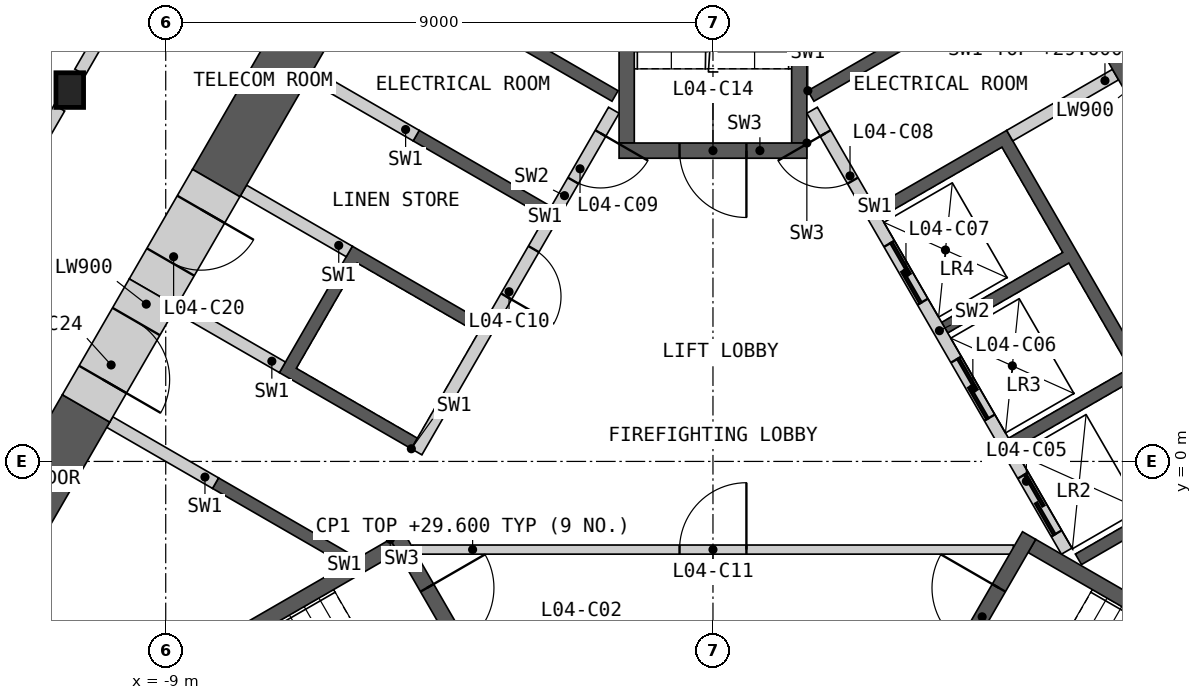
"""IFC4 building model, lengths in metres.
Left out: names, types, materials, properties, quantities, classifications, styles, units other than length and angle.
Written with IfcOpenShell. Run it as: python <this file> out.ifc"""

import sys

from ifc_helpers import new_model, si_unit, direction, frame, frame_2d, origin, origin_2d, place, context, subcontext, project, spatial, polyline, rectangle, i_section, outline, extrude, element, fill, save


model = new_model("IFC4")
c1 = context("Model", 3, precision=1e-05, world=origin(), true_north=direction((0.0, 1.0)))
c2 = subcontext(c1, "Body", "Model", "MODEL_VIEW")
j1 = project(units=[si_unit("LENGTHUNIT", "METRE"), si_unit("PLANEANGLEUNIT", "RADIAN")], contexts=[c1])
p1 = place(None, origin())
s1 = spatial("IfcSite", under=j1, at=p1, CompositionType="ELEMENT")
p2 = place(p1, origin())
s2 = spatial("IfcBuilding", under=s1, at=p2, CompositionType="ELEMENT")
p3 = place(p2, frame((0.0, 0.0, 25.5)))
s3 = spatial("IfcBuildingStorey", under=s2, at=p3, CompositionType="ELEMENT", Elevation=25.5)
p4 = place(p3, frame((-10.578, 6.107, 0.0), z_axis=(0.0, 0.0, 1.0), x_axis=(1.0, 0.0, 0.0)))
e1 = element("IfcColumn", 1, at=p4, inside=s3, PredefinedType="COLUMN", context=c2, shape_type="SweptSolid", body=[
    extrude(i_section(OverallWidth=0.454, OverallDepth=0.57, WebThickness=0.078, FlangeThickness=0.125, at=origin_2d()), origin(), (0.0, 0.0, 1.0), 4.5),
])
p5 = place(p3, origin())
e2 = element("IfcWall", 2, at=p5, inside=s3, PredefinedType="SHEAR", context=c2, shape_type="SweptSolid", body=[
    extrude(outline(polyline([(1.561, 6.097), (3.731, 7.35), (3.831, 7.177), (1.66, 5.924), (1.561, 6.097)])), origin(), (0.0, 0.0, 1.0), 4.1),
])
p6 = place(p3, origin())
e3 = element("IfcWall", 3, at=p6, inside=s3, PredefinedType="SHEAR", context=c2, shape_type="SweptSolid", body=[
    extrude(outline(polyline([(2.66, 4.192), (4.831, 5.445), (8.231, -0.444), (6.061, -1.697), (5.96, -1.524), (7.952, -0.374), (6.952, 1.358), (4.96, 0.208), (4.861, 0.381), (6.852, 1.531), (5.852, 3.263), (3.861, 2.113), (3.76, 2.287), (5.752, 3.437), (4.752, 5.169), (2.76, 4.019), (2.66, 4.192)])), origin(), (0.0, 0.0, 1.0), 4.1),
])
p7 = place(p3, frame((5.817, -1.476, 0.0), z_axis=(0.0, 0.0, 1.0), x_axis=(-0.500002616675, 0.866023893041, 0.0)))
e4 = element("IfcWall", 4, at=p7, inside=s3, PredefinedType="SOLIDWALL", context=c2, shape_type="SweptSolid", body=[
    extrude(rectangle(XDim=8.373, YDim=0.2, at=frame_2d((4.187, 0.0))), origin(), (0.0, 0.0, 1.0), 4.1),
])
p8 = place(p7, frame((0.337, 0.0, 0.0)))
e5 = element("IfcOpeningElement", 5, at=p8, cuts=e4, PredefinedType="OPENING", context=c2, shape_type="SweptSolid", body=[
    extrude(rectangle(XDim=1.1, YDim=2.1, at=frame_2d((0.55, 1.05))), frame((0.0, 0.11, 0.0), z_axis=(0.0, -1.0, 0.0), x_axis=(1.0, 0.0, 0.0)), (0.0, 0.0, 1.0), 0.22),
])
p9 = place(p7, frame((2.537, 0.0, 0.0)))
e6 = element("IfcOpeningElement", 6, at=p9, cuts=e4, PredefinedType="OPENING", context=c2, shape_type="SweptSolid", body=[
    extrude(rectangle(XDim=1.1, YDim=2.1, at=frame_2d((0.55, 1.05))), frame((0.0, 0.11, 0.0), z_axis=(0.0, -1.0, 0.0), x_axis=(1.0, 0.0, 0.0)), (0.0, 0.0, 1.0), 0.22),
])
p10 = place(p7, frame((4.737, 0.0, 0.0)))
e7 = element("IfcOpeningElement", 7, at=p10, cuts=e4, PredefinedType="OPENING", context=c2, shape_type="SweptSolid", body=[
    extrude(rectangle(XDim=1.1, YDim=2.1, at=frame_2d((0.55, 1.05))), frame((0.0, 0.11, 0.0), z_axis=(0.0, -1.0, 0.0), x_axis=(1.0, 0.0, 0.0)), (0.0, 0.0, 1.0), 0.22),
])
p11 = place(p7, frame((7.037, 0.0, 0.0)))
e8 = element("IfcOpeningElement", 8, at=p11, cuts=e4, PredefinedType="OPENING", context=c2, shape_type="SweptSolid", body=[
    extrude(rectangle(XDim=0.9, YDim=2.1, at=frame_2d((0.45, 1.05))), frame((0.0, 0.11, 0.0), z_axis=(0.0, -1.0, 0.0), x_axis=(1.0, 0.0, 0.0)), (0.0, 0.0, 1.0), 0.22),
])
p12 = place(p3, frame((4.881, 5.358, 0.0), z_axis=(0.0, 0.0, 1.0), x_axis=(0.866035824272, 0.499981950752, 0.0)))
e9 = element("IfcWall", 9, at=p12, inside=s3, PredefinedType="SHEAR", context=c2, shape_type="SweptSolid", body=[
    extrude(rectangle(XDim=2.009, YDim=0.2, at=frame_2d((1.004, 0.0))), origin(), (0.0, 0.0, 1.0), 4.1),
])
p13 = place(p3, origin())
e10 = element("IfcWall", 10, at=p13, inside=s3, PredefinedType="SHEAR", context=c2, shape_type="SweptSolid", body=[
    extrude(outline(polyline([(-6.061, -1.697), (-8.231, -0.444), (-8.131, -0.271), (-5.96, -1.524), (-6.061, -1.697)])), origin(), (0.0, 0.0, 1.0), 4.1),
])
p14 = place(p3, origin())
e11 = element("IfcWall", 11, at=p14, inside=s3, PredefinedType="SHEAR", context=c2, shape_type="SweptSolid", body=[
    extrude(outline(polyline([(-4.96, 0.208), (-7.131, 1.461), (-5.931, 3.54), (-3.76, 2.287), (-3.861, 2.113), (-5.852, 3.263), (-6.852, 1.531), (-4.861, 0.381), (-4.96, 0.208)])), origin(), (0.0, 0.0, 1.0), 4.1),
])
p15 = place(p3, origin())
e12 = element("IfcWall", 12, at=p15, inside=s3, PredefinedType="SHEAR", context=c2, shape_type="SweptSolid", body=[
    extrude(outline(polyline([(-2.76, 4.019), (-4.931, 5.272), (-4.831, 5.445), (-2.66, 4.192), (-2.76, 4.019)])), origin(), (0.0, 0.0, 1.0), 4.1),
])
p16 = place(p3, origin())
e13 = element("IfcWall", 13, at=p16, inside=s3, PredefinedType="SHEAR", context=c2, shape_type="SweptSolid", body=[
    extrude(outline(polyline([(-3.731, 7.35), (-1.561, 6.097), (-1.66, 5.924), (-3.831, 7.177), (-3.731, 7.35)])), origin(), (0.0, 0.0, 1.0), 4.1),
])
p17 = place(p3, frame((-1.631, 5.776, 0.0), z_axis=(0.0, 0.0, 1.0), x_axis=(-0.499992876559, -0.866029516466, 0.0)))
e14 = element("IfcWall", 14, at=p17, inside=s3, PredefinedType="SOLIDWALL", context=c2, shape_type="SweptSolid", body=[
    extrude(rectangle(XDim=6.486, YDim=0.2, at=frame_2d((3.243, 0.0))), origin(), (0.0, 0.0, 1.0), 4.1),
])
p18 = place(p17, frame((0.437, 0.0, 0.0)))
e15 = element("IfcOpeningElement", 15, at=p18, cuts=e14, PredefinedType="OPENING", context=c2, shape_type="SweptSolid", body=[
    extrude(rectangle(XDim=0.9, YDim=2.1, at=frame_2d((0.45, 1.05))), frame((0.0, 0.11, 0.0), z_axis=(0.0, -1.0, 0.0), x_axis=(1.0, 0.0, 0.0)), (0.0, 0.0, 1.0), 0.22),
])
p19 = place(p17, frame((2.637, 0.0, 0.0)))
e16 = element("IfcOpeningElement", 16, at=p19, cuts=e14, PredefinedType="OPENING", context=c2, shape_type="SweptSolid", body=[
    extrude(rectangle(XDim=0.9, YDim=2.1, at=frame_2d((0.45, 1.05))), frame((0.0, 0.11, 0.0), z_axis=(0.0, -1.0, 0.0), x_axis=(1.0, 0.0, 0.0)), (0.0, 0.0, 1.0), 0.22),
])
p20 = place(p3, frame((-4.881, 5.358, 0.0), z_axis=(0.0, 0.0, 1.0), x_axis=(-0.866035824272, 0.499981950752, 0.0)))
e17 = element("IfcWall", 17, at=p20, inside=s3, PredefinedType="SHEAR", context=c2, shape_type="SweptSolid", body=[
    extrude(rectangle(XDim=2.009, YDim=0.2, at=frame_2d((1.004, 0.0))), origin(), (0.0, 0.0, 1.0), 4.1),
])
p21 = place(p3, frame((-5.981, 3.453, 0.0), z_axis=(0.0, 0.0, 1.0), x_axis=(-0.866013584312, 0.500020471368, 0.0)))
e18 = element("IfcWall", 18, at=p21, inside=s3, PredefinedType="SHEAR", context=c2, shape_type="SweptSolid", body=[
    extrude(rectangle(XDim=2.009, YDim=0.2, at=frame_2d((1.005, 0.0))), origin(), (0.0, 0.0, 1.0), 4.1),
])
p22 = place(p3, frame((-7.081, 1.548, 0.0), z_axis=(0.0, 0.0, 1.0), x_axis=(-0.865983199114, 0.50007309351, 0.0)))
e19 = element("IfcWall", 19, at=p22, inside=s3, PredefinedType="SHEAR", context=c2, shape_type="SweptSolid", body=[
    extrude(rectangle(XDim=2.009, YDim=0.2, at=frame_2d((1.004, 0.0))), origin(), (0.0, 0.0, 1.0), 4.1),
])
p23 = place(p3, frame((-8.181, -0.357, 0.0), z_axis=(0.0, 0.0, 1.0), x_axis=(-0.866035824272, 0.499981950752, 0.0)))
e20 = element("IfcWall", 20, at=p23, inside=s3, PredefinedType="SHEAR", context=c2, shape_type="SweptSolid", body=[
    extrude(rectangle(XDim=2.009, YDim=0.2, at=frame_2d((1.004, 0.0))), origin(), (0.0, 0.0, 1.0), 4.1),
])
p24 = place(p3, frame((-4.941, -1.45, 0.0), z_axis=(0.0, 0.0, 1.0), x_axis=(1.0, 0.0, 0.0)))
e21 = element("IfcWall", 21, at=p24, inside=s3, PredefinedType="PARTITIONING", context=c2, shape_type="SweptSolid", body=[
    extrude(rectangle(XDim=9.882, YDim=0.15, at=frame_2d((4.941, 0.0))), origin(), (0.0, 0.0, 1.0), 4.1),
])
p25 = place(p24, frame((4.391, 0.0, 0.0)))
e22 = element("IfcOpeningElement", 22, at=p25, cuts=e21, PredefinedType="OPENING", context=c2, shape_type="SweptSolid", body=[
    extrude(rectangle(XDim=1.1, YDim=2.1, at=frame_2d((0.55, 1.05))), frame((0.0, 0.085, 0.0), z_axis=(0.0, -1.0, 0.0), x_axis=(1.0, 0.0, 0.0)), (0.0, 0.0, 1.0), 0.17),
])
p26 = place(p3, origin())
e23 = element("IfcWall", 23, at=p26, inside=s3, PredefinedType="SHEAR", context=c2, shape_type="SweptSolid", body=[
    extrude(outline(polyline([(-5.307, -1.281), (-10.374, -4.206), (-10.032, -4.298), (-5.182, -1.498), (-5.307, -1.281)])), origin(), (0.0, 0.0, 1.0), 4.1),
])
p27 = place(p3, frame((-5.199, -1.219, 0.0), z_axis=(0.0, 0.0, 1.0), x_axis=(0.499982516597, -0.866035497597, 0.0)))
e24 = element("IfcWall", 24, at=p27, inside=s3, PredefinedType="SHEAR", context=c2, shape_type="SweptSolid", body=[
    extrude(rectangle(XDim=3.088, YDim=0.25, at=frame_2d((1.544, 0.0))), origin(), (0.0, 0.0, 1.0), 4.1),
])
p28 = place(p27, frame((0.994, 0.0, 0.0)))
e25 = element("IfcOpeningElement", 25, at=p28, cuts=e24, PredefinedType="OPENING", context=c2, shape_type="SweptSolid", body=[
    extrude(rectangle(XDim=1.1, YDim=2.1, at=frame_2d((0.55, 1.05))), frame((0.0, 0.135, 0.0), z_axis=(0.0, -1.0, 0.0), x_axis=(1.0, 0.0, 0.0)), (0.0, 0.0, 1.0), 0.27),
])
p29 = place(p3, origin())
e26 = element("IfcWall", 26, at=p29, inside=s3, PredefinedType="SHEAR", context=c2, shape_type="SweptSolid", body=[
    extrude(outline(polyline([(10.032, -4.298), (10.374, -4.206), (5.307, -1.281), (5.182, -1.498), (10.032, -4.298)])), origin(), (0.0, 0.0, 1.0), 4.1),
])
p30 = place(p3, frame((3.655, -3.893, 0.0), z_axis=(0.0, 0.0, 1.0), x_axis=(0.499982516597, 0.866035497597, 0.0)))
e27 = element("IfcWall", 27, at=p30, inside=s3, PredefinedType="SHEAR", context=c2, shape_type="SweptSolid", body=[
    extrude(rectangle(XDim=3.088, YDim=0.25, at=frame_2d((1.544, 0.0))), origin(), (0.0, 0.0, 1.0), 4.1),
])
p31 = place(p30, frame((0.994, 0.0, 0.0)))
e28 = element("IfcOpeningElement", 28, at=p31, cuts=e27, PredefinedType="OPENING", context=c2, shape_type="SweptSolid", body=[
    extrude(rectangle(XDim=1.1, YDim=2.1, at=frame_2d((0.55, 1.05))), frame((0.0, 0.135, 0.0), z_axis=(0.0, -1.0, 0.0), x_axis=(1.0, 0.0, 0.0)), (0.0, 0.0, 1.0), 0.27),
])
p32 = place(p3, origin())
e29 = element("IfcWall", 29, at=p32, inside=s3, PredefinedType="SHEAR", context=c2, shape_type="SweptSolid", body=[
    extrude(outline(polyline([(1.544, 5.237), (1.544, 11.087), (1.294, 10.837), (1.294, 5.237), (1.544, 5.237)])), origin(), (0.0, 0.0, 1.0), 4.1),
])
p33 = place(p3, origin())
e30 = element("IfcWall", 30, at=p33, inside=s3, PredefinedType="SHEAR", context=c2, shape_type="SweptSolid", body=[
    extrude(outline(polyline([(-1.294, 10.837), (-1.544, 11.087), (-1.544, 5.237), (-1.294, 5.237), (-1.294, 10.837)])), origin(), (0.0, 0.0, 1.0), 4.1),
])
p34 = place(p3, frame((1.544, 5.112, 0.0), z_axis=(0.0, 0.0, 1.0), x_axis=(-1.0, 0.0, 0.0)))
e31 = element("IfcWall", 31, at=p34, inside=s3, PredefinedType="SHEAR", context=c2, shape_type="SweptSolid", body=[
    extrude(rectangle(XDim=3.088, YDim=0.25, at=frame_2d((1.544, 0.0))), origin(), (0.0, 0.0, 1.0), 4.1),
])
p35 = place(p34, frame((0.994, 0.0, 0.0)))
e32 = element("IfcOpeningElement", 32, at=p35, cuts=e31, PredefinedType="OPENING", context=c2, shape_type="SweptSolid", body=[
    extrude(rectangle(XDim=1.1, YDim=2.1, at=frame_2d((0.55, 1.05))), frame((0.0, 0.135, 0.0), z_axis=(0.0, -1.0, 0.0), x_axis=(1.0, 0.0, 0.0)), (0.0, 0.0, 1.0), 0.27),
])
p36 = place(p3, frame((8.684, 3.688, 0.0), z_axis=(0.0, 0.0, 1.0), x_axis=(-0.499990189338, 0.866031067899, 0.0)))
e33 = element("IfcWall", 33, at=p36, inside=s3, PredefinedType="SHEAR", context=c2, shape_type="SweptSolid", body=[
    extrude(rectangle(XDim=6.157, YDim=0.9, at=frame_2d((3.078, 0.0))), origin(), (0.0, 0.0, 1.0), 4.1),
])
p37 = place(p3, frame((-5.606, 9.021, 0.0), z_axis=(0.0, 0.0, 1.0), x_axis=(-0.500024603663, -0.866011198387, 0.0)))
e34 = element("IfcWall", 34, at=p37, inside=s3, PredefinedType="SHEAR", context=c2, shape_type="SweptSolid", body=[
    extrude(rectangle(XDim=5.129, YDim=0.9, at=frame_2d((2.564, 0.0))), origin(), (0.0, 0.0, 1.0), 4.1),
])
p38 = place(p3, frame((-10.31, 0.872, 0.0), z_axis=(0.0, 0.0, 1.0), x_axis=(-0.499991893987, -0.866030083742, 0.0)))
e35 = element("IfcWall", 35, at=p38, inside=s3, PredefinedType="SHEAR", context=c2, shape_type="SweptSolid", body=[
    extrude(rectangle(XDim=4.471, YDim=0.9, at=frame_2d((2.235, 0.0))), origin(), (0.0, 0.0, 1.0), 4.1),
])
p39 = place(p3, frame((-8.17, 4.579, 0.0), z_axis=(0.0, 0.0, 1.0), x_axis=(-0.499888406853, -0.866089822532, 0.0)))
e36 = element("IfcWall", 36, at=p39, inside=s3, PredefinedType="SHEAR", context=c2, shape_type="SweptSolid", body=[
    extrude(rectangle(XDim=2.08, YDim=0.9, at=frame_2d((1.04, 0.0))), origin(), (0.0, 0.0, 1.0), 4.1),
])
p40 = place(p39, frame((0.5, 0.0, 0.0)))
e37 = element("IfcOpeningElement", 37, at=p40, cuts=e36, PredefinedType="OPENING", context=c2, shape_type="SweptSolid", body=[
    extrude(rectangle(XDim=1.0, YDim=2.1, at=frame_2d((0.5, 1.05))), frame((0.0, 0.46, 0.0), z_axis=(0.0, -1.0, 0.0), x_axis=(1.0, 0.0, 0.0)), (0.0, 0.0, 1.0), 0.92),
])
p41 = place(p3, frame((-9.21, 2.777, 0.0), z_axis=(0.0, 0.0, 1.0), x_axis=(-0.500077893725, -0.86598042715, 0.0)))
e38 = element("IfcWall", 38, at=p41, inside=s3, PredefinedType="SHEAR", context=c2, shape_type="SweptSolid", body=[
    extrude(rectangle(XDim=2.2, YDim=0.9, at=frame_2d((1.1, 0.0))), origin(), (0.0, 0.0, 1.0), 4.1),
])
p42 = place(p41, frame((0.55, 0.0, 0.0)))
e39 = element("IfcOpeningElement", 39, at=p42, cuts=e38, PredefinedType="OPENING", context=c2, shape_type="SweptSolid", body=[
    extrude(rectangle(XDim=1.1, YDim=2.1, at=frame_2d((0.55, 1.05))), frame((0.0, 0.46, 0.0), z_axis=(0.0, -1.0, 0.0), x_axis=(1.0, 0.0, 0.0)), (0.0, 0.0, 1.0), 0.92),
])
p43 = place(p3, frame((-15.698, -2.759, 0.0), z_axis=(0.0, 0.0, 1.0), x_axis=(0.500004292778, 0.866022925334, 0.0)))
e40 = element("IfcWall", 40, at=p43, inside=s3, PredefinedType="PARTITIONING", context=c2, shape_type="SweptSolid", body=[
    extrude(rectangle(XDim=9.898, YDim=0.2, at=frame_2d((4.949, 0.0))), origin(), (0.0, 0.0, 1.0), 4.1),
])
p44 = place(p43, frame((4.1, 0.0, 0.0)))
e41 = element("IfcOpeningElement", 41, at=p44, cuts=e40, PredefinedType="OPENING", context=c2, shape_type="SweptSolid", body=[
    extrude(rectangle(XDim=1.8, YDim=2.1, at=frame_2d((0.9, 1.05))), frame((0.0, 0.11, 0.0), z_axis=(0.0, -1.0, 0.0), x_axis=(1.0, 0.0, 0.0)), (0.0, 0.0, 1.0), 0.22),
])
for number, where, z_axis, x_axis in (
    (42, (5.459, 14.974, 0.0), (0.0, 0.0, 1.0), (0.5, -0.866, 0.0)),
    (43, (-10.408, 6.402, 0.0), (0.0, 0.0, 1.0), (0.5, 0.866, 0.0)),
):
    element("IfcWall", number, at=place(p3, frame(where, z_axis=z_axis, x_axis=x_axis)), inside=s3, PredefinedType="PARTITIONING", context=c2, shape_type="SweptSolid", body=[
        extrude(rectangle(XDim=9.898, YDim=0.2, at=frame_2d((4.949, 0.0))), origin(), (0.0, 0.0, 1.0), 4.1),
    ])
p45 = place(p8, origin())
e44 = element("IfcDoor", 44, at=p45, inside=s3, OperationType="SLIDING_TO_LEFT", PredefinedType="DOOR", context=c2, shape_type="SweptSolid", body=[
    extrude(rectangle(XDim=1.1, YDim=2.1, at=frame_2d((0.55, 1.05))), frame((0.0, 0.025, 0.0), z_axis=(0.0, -1.0, 0.0), x_axis=(1.0, 0.0, 0.0)), (0.0, 0.0, 1.0), 0.05),
])
fill(e5, e44)
p46 = place(p9, origin())
e45 = element("IfcDoor", 45, at=p46, inside=s3, OperationType="SLIDING_TO_LEFT", PredefinedType="DOOR", context=c2, shape_type="SweptSolid", body=[
    extrude(rectangle(XDim=1.1, YDim=2.1, at=frame_2d((0.55, 1.05))), frame((0.0, 0.025, 0.0), z_axis=(0.0, -1.0, 0.0), x_axis=(1.0, 0.0, 0.0)), (0.0, 0.0, 1.0), 0.05),
])
fill(e6, e45)
p47 = place(p10, origin())
e46 = element("IfcDoor", 46, at=p47, inside=s3, OperationType="SLIDING_TO_LEFT", PredefinedType="DOOR", context=c2, shape_type="SweptSolid", body=[
    extrude(rectangle(XDim=1.1, YDim=2.1, at=frame_2d((0.55, 1.05))), frame((0.0, 0.025, 0.0), z_axis=(0.0, -1.0, 0.0), x_axis=(1.0, 0.0, 0.0)), (0.0, 0.0, 1.0), 0.05),
])
fill(e7, e46)
p48 = place(p11, origin())
e47 = element("IfcDoor", 47, at=p48, inside=s3, OperationType="SINGLE_SWING_RIGHT", PredefinedType="DOOR", context=c2, shape_type="SweptSolid", body=[
    extrude(rectangle(XDim=0.9, YDim=2.1, at=frame_2d((0.45, 1.05))), frame((0.0, 0.025, 0.0), z_axis=(0.0, -1.0, 0.0), x_axis=(1.0, 0.0, 0.0)), (0.0, 0.0, 1.0), 0.05),
])
fill(e8, e47)
p49 = place(p18, origin())
e48 = element("IfcDoor", 48, at=p49, inside=s3, OperationType="SINGLE_SWING_LEFT", PredefinedType="DOOR", context=c2, shape_type="SweptSolid", body=[
    extrude(rectangle(XDim=0.9, YDim=2.1, at=frame_2d((0.45, 1.05))), frame((0.0, 0.025, 0.0), z_axis=(0.0, -1.0, 0.0), x_axis=(1.0, 0.0, 0.0)), (0.0, 0.0, 1.0), 0.05),
])
fill(e15, e48)
p50 = place(p19, origin())
e49 = element("IfcDoor", 49, at=p50, inside=s3, OperationType="SINGLE_SWING_RIGHT", PredefinedType="DOOR", context=c2, shape_type="SweptSolid", body=[
    extrude(rectangle(XDim=0.9, YDim=2.1, at=frame_2d((0.45, 1.05))), frame((0.0, 0.025, 0.0), z_axis=(0.0, -1.0, 0.0), x_axis=(1.0, 0.0, 0.0)), (0.0, 0.0, 1.0), 0.05),
])
fill(e16, e49)
p51 = place(p25, origin())
e50 = element("IfcDoor", 50, at=p51, inside=s3, OperationType="SINGLE_SWING_RIGHT", PredefinedType="DOOR", context=c2, shape_type="SweptSolid", body=[
    extrude(rectangle(XDim=1.1, YDim=2.1, at=frame_2d((0.55, 1.05))), frame((0.0, 0.025, 0.0), z_axis=(0.0, -1.0, 0.0), x_axis=(1.0, 0.0, 0.0)), (0.0, 0.0, 1.0), 0.05),
])
fill(e22, e50)
p52 = place(p28, origin())
e51 = element("IfcDoor", 51, at=p52, inside=s3, OperationType="SINGLE_SWING_LEFT", PredefinedType="DOOR", context=c2, shape_type="SweptSolid", body=[
    extrude(rectangle(XDim=1.1, YDim=2.1, at=frame_2d((0.55, 1.05))), frame((0.0, 0.025, 0.0), z_axis=(0.0, -1.0, 0.0), x_axis=(1.0, 0.0, 0.0)), (0.0, 0.0, 1.0), 0.05),
])
fill(e25, e51)
p53 = place(p31, origin())
e52 = element("IfcDoor", 52, at=p53, inside=s3, OperationType="SINGLE_SWING_RIGHT", PredefinedType="DOOR", context=c2, shape_type="SweptSolid", body=[
    extrude(rectangle(XDim=1.1, YDim=2.1, at=frame_2d((0.55, 1.05))), frame((0.0, 0.025, 0.0), z_axis=(0.0, -1.0, 0.0), x_axis=(1.0, 0.0, 0.0)), (0.0, 0.0, 1.0), 0.05),
])
fill(e28, e52)
p54 = place(p35, origin())
e53 = element("IfcDoor", 53, at=p54, inside=s3, OperationType="SINGLE_SWING_LEFT", PredefinedType="DOOR", context=c2, shape_type="SweptSolid", body=[
    extrude(rectangle(XDim=1.1, YDim=2.1, at=frame_2d((0.55, 1.05))), frame((0.0, 0.025, 0.0), z_axis=(0.0, -1.0, 0.0), x_axis=(1.0, 0.0, 0.0)), (0.0, 0.0, 1.0), 0.05),
])
fill(e32, e53)
p55 = place(p40, origin())
e54 = element("IfcDoor", 54, at=p55, inside=s3, OperationType="SINGLE_SWING_LEFT", PredefinedType="DOOR", context=c2, shape_type="SweptSolid", body=[
    extrude(rectangle(XDim=1.0, YDim=2.1, at=frame_2d((0.5, 1.05))), frame((0.0, 0.205, 0.0), z_axis=(0.0, -1.0, 0.0), x_axis=(1.0, 0.0, 0.0)), (0.0, 0.0, 1.0), 0.05),
])
fill(e37, e54)
p56 = place(p42, origin())
e55 = element("IfcDoor", 55, at=p56, inside=s3, OperationType="SINGLE_SWING_RIGHT", PredefinedType="DOOR", context=c2, shape_type="SweptSolid", body=[
    extrude(rectangle(XDim=1.1, YDim=2.1, at=frame_2d((0.55, 1.05))), frame((0.0, 0.205, 0.0), z_axis=(0.0, -1.0, 0.0), x_axis=(1.0, 0.0, 0.0)), (0.0, 0.0, 1.0), 0.05),
])
fill(e39, e55)
save(model, sys.argv[1])
